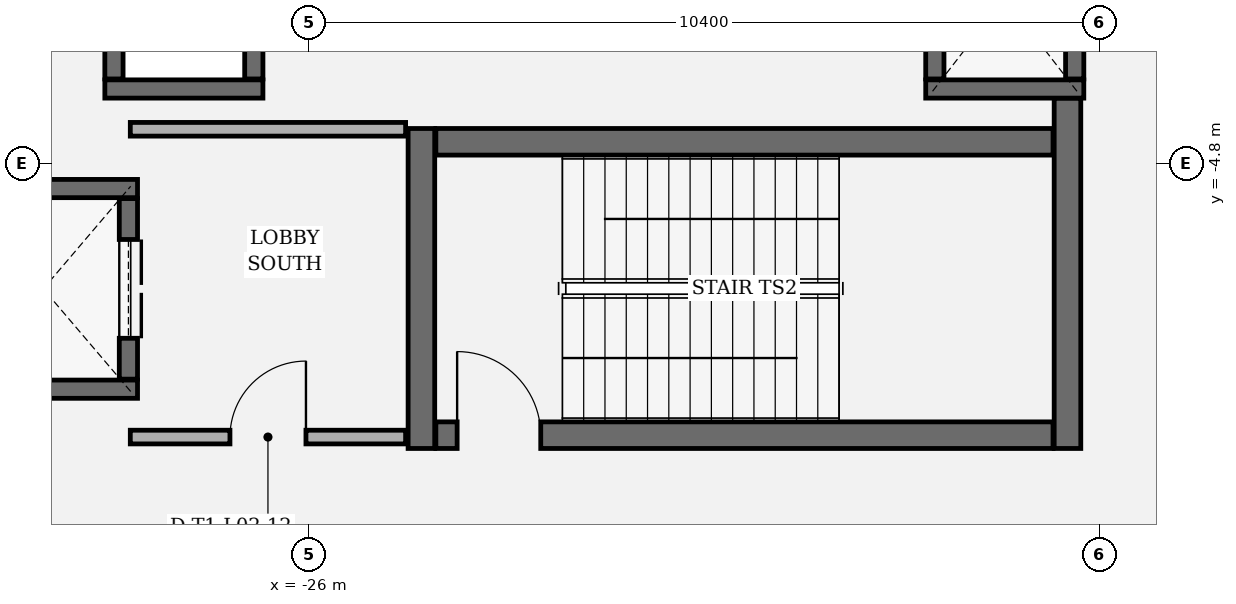
"""IFC4 building model, lengths in metres.
Left out: names, types, materials, properties, quantities, classifications, styles, units other than length and angle.
Written with IfcOpenShell. Run it as: python <this file> out.ifc"""

import sys

from ifc_helpers import new_model, si_unit, direction, frame, frame_2d, origin, place, context, subcontext, project, spatial, rectangle, extrude, element, fill, save


model = new_model("IFC4")
c1 = context("Model", 3, precision=1e-05, world=origin(), true_north=direction((0.0, 1.0)))
c2 = subcontext(c1, "Body", "Model", "MODEL_VIEW")
j1 = project(units=[si_unit("LENGTHUNIT", "METRE"), si_unit("PLANEANGLEUNIT", "RADIAN")], contexts=[c1])
p1 = place(None, origin())
s1 = spatial("IfcSite", under=j1, at=p1, CompositionType="ELEMENT")
p2 = place(p1, origin())
s2 = spatial("IfcBuilding", under=s1, at=p2, CompositionType="ELEMENT")
p3 = place(p2, frame((0.0, 0.0, 12.0)))
s3 = spatial("IfcBuildingStorey", under=s2, at=p3, CompositionType="ELEMENT", Elevation=12.0)
p4 = place(p3, frame((-13.635, -37.094, 0.0), z_axis=(0.0, 0.0, 1.0), x_axis=(-0.842602364841, 0.538536214905, 0.0)))
e1 = element("IfcWall", 1, at=p4, inside=s3, PredefinedType="SOLIDWALL", context=c2, shape_type="SweptSolid", body=[
    extrude(rectangle(XDim=60.27, YDim=0.38, at=frame_2d((30.135, 0.0))), origin(), (0.0, 0.0, 1.0), 4.74),
])
p5 = place(p4, frame((29.435, 0.0, 0.8)))
e2 = element("IfcOpeningElement", 2, at=p5, cuts=e1, PredefinedType="OPENING", context=c2, shape_type="SweptSolid", body=[
    extrude(rectangle(XDim=1.4, YDim=1.5, at=frame_2d((0.7, 0.75))), frame((0.0, 0.2, 0.0), z_axis=(0.0, -1.0, 0.0), x_axis=(1.0, 0.0, 0.0)), (0.0, 0.0, 1.0), 0.4),
])
p6 = place(p3, frame((-24.525, -4.34, 0.0), z_axis=(0.0, 0.0, 1.0), x_axis=(0.0, -1.0, 0.0)))
e3 = element("IfcWall", 3, at=p6, inside=s3, PredefinedType="SHEAR", context=c2, shape_type="SweptSolid", body=[
    extrude(rectangle(XDim=4.21, YDim=0.35, at=frame_2d((2.105, 0.0))), origin(), (0.0, 0.0, 1.0), 4.74),
])
p7 = place(p3, frame((-16.025, -8.55, 0.0), z_axis=(0.0, 0.0, 1.0), x_axis=(0.0, 1.0, 0.0)))
e4 = element("IfcWall", 4, at=p7, inside=s3, PredefinedType="SHEAR", context=c2, shape_type="SweptSolid", body=[
    extrude(rectangle(XDim=4.61, YDim=0.35, at=frame_2d((2.305, 0.0))), origin(), (0.0, 0.0, 1.0), 4.74),
])
p8 = place(p3, frame((-24.335, -8.375, 0.0), z_axis=(0.0, 0.0, 1.0), x_axis=(1.0, 0.0, 0.0)))
e5 = element("IfcWall", 5, at=p8, inside=s3, PredefinedType="SHEAR", context=c2, shape_type="SweptSolid", body=[
    extrude(rectangle(XDim=8.12, YDim=0.35, at=frame_2d((4.06, 0.0))), origin(), (0.0, 0.0, 1.0), 4.74),
])
p9 = place(p8, frame((0.28, 0.0, 0.0)))
e6 = element("IfcOpeningElement", 6, at=p9, cuts=e5, PredefinedType="OPENING", context=c2, shape_type="SweptSolid", body=[
    extrude(rectangle(XDim=1.1, YDim=2.2, at=frame_2d((0.55, 1.1))), frame((0.0, 0.185, 0.0), z_axis=(0.0, -1.0, 0.0), x_axis=(1.0, 0.0, 0.0)), (0.0, 0.0, 1.0), 0.37),
])
p10 = place(p3, frame((-16.215, -4.515, 0.0), z_axis=(0.0, 0.0, 1.0), x_axis=(-1.0, 0.0, 0.0)))
e7 = element("IfcWall", 7, at=p10, inside=s3, PredefinedType="SHEAR", context=c2, shape_type="SweptSolid", body=[
    extrude(rectangle(XDim=8.12, YDim=0.35, at=frame_2d((4.06, 0.0))), origin(), (0.0, 0.0, 1.0), 4.74),
])
for number, where, z_axis, x_axis in (
    (8, (-28.26, -7.77, 0.0), (0.0, 0.0, 1.0), (-1.0, 0.0, 0.0)),
    (9, (-30.74, -5.13, 0.0), (0.0, 0.0, 1.0), (1.0, 0.0, 0.0)),
):
    element("IfcWall", number, at=place(p3, frame(where, z_axis=z_axis, x_axis=x_axis)), inside=s3, PredefinedType="SHEAR", context=c2, shape_type="SweptSolid", body=[
        extrude(rectangle(XDim=2.48, YDim=0.24, at=frame_2d((1.24, 0.0))), origin(), (0.0, 0.0, 1.0), 4.74),
    ])
p11 = place(p3, frame((-28.38, -5.262, 0.0), z_axis=(0.0, 0.0, 1.0), x_axis=(0.0, -1.0, 0.0)))
e10 = element("IfcWall", 10, at=p11, inside=s3, PredefinedType="SHEAR", context=c2, shape_type="SweptSolid", body=[
    extrude(rectangle(XDim=2.376, YDim=0.24, at=frame_2d((1.188, 0.0))), origin(), (0.0, 0.0, 1.0), 4.74),
])
p12 = place(p11, frame((0.538, 0.0, 0.0)))
e11 = element("IfcOpeningElement", 11, at=p12, cuts=e10, PredefinedType="OPENING", context=c2, shape_type="SweptSolid", body=[
    extrude(rectangle(XDim=1.3, YDim=2.3, at=frame_2d((0.65, 1.15))), frame((0.0, 0.13, 0.0), z_axis=(0.0, -1.0, 0.0), x_axis=(1.0, 0.0, 0.0)), (0.0, 0.0, 1.0), 0.26),
])
p13 = place(p3, frame((-26.61, -3.82, 0.0), z_axis=(0.0, 0.0, 1.0), x_axis=(-1.0, 0.0, 0.0)))
e12 = element("IfcWall", 12, at=p13, inside=s3, PredefinedType="SHEAR", context=c2, shape_type="SweptSolid", body=[
    extrude(rectangle(XDim=2.08, YDim=0.24, at=frame_2d((1.04, 0.0))), origin(), (0.0, 0.0, 1.0), 4.74),
])
for number, where, z_axis, x_axis in (
    (13, (-28.57, -3.688, 0.0), (0.0, 0.0, 1.0), (0.0, 1.0, 0.0)),
    (14, (-26.73, -1.562, 0.0), (0.0, 0.0, 1.0), (0.0, -1.0, 0.0)),
):
    element("IfcWall", number, at=place(p3, frame(where, z_axis=z_axis, x_axis=x_axis)), inside=s3, PredefinedType="SHEAR", context=c2, shape_type="SweptSolid", body=[
        extrude(rectangle(XDim=2.126, YDim=0.24, at=frame_2d((1.063, 0.0))), origin(), (0.0, 0.0, 1.0), 4.74),
    ])
p14 = place(p3, frame((-15.81, -3.82, 0.0), z_axis=(0.0, 0.0, 1.0), x_axis=(-1.0, 0.0, 0.0)))
e15 = element("IfcWall", 15, at=p14, inside=s3, PredefinedType="SHEAR", context=c2, shape_type="SweptSolid", body=[
    extrude(rectangle(XDim=2.08, YDim=0.24, at=frame_2d((1.04, 0.0))), origin(), (0.0, 0.0, 1.0), 4.74),
])
for number, where, z_axis, x_axis in (
    (16, (-17.77, -3.688, 0.0), (0.0, 0.0, 1.0), (0.0, 1.0, 0.0)),
    (17, (-15.93, -1.562, 0.0), (0.0, 0.0, 1.0), (0.0, -1.0, 0.0)),
):
    element("IfcWall", number, at=place(p3, frame(where, z_axis=z_axis, x_axis=x_axis)), inside=s3, PredefinedType="SHEAR", context=c2, shape_type="SweptSolid", body=[
        extrude(rectangle(XDim=2.126, YDim=0.24, at=frame_2d((1.063, 0.0))), origin(), (0.0, 0.0, 1.0), 4.74),
    ])
p15 = place(p3, frame((-28.355, -8.4, 0.0), z_axis=(0.0, 0.0, 1.0), x_axis=(1.0, 0.0, 0.0)))
e18 = element("IfcWall", 18, at=p15, inside=s3, PredefinedType="PARTITIONING", context=c2, shape_type="SweptSolid", body=[
    extrude(rectangle(XDim=3.622, YDim=0.18, at=frame_2d((1.811, 0.0))), origin(), (0.0, 0.0, 1.0), 4.74),
])
p16 = place(p15, frame((1.311, 0.0, 0.0)))
e19 = element("IfcOpeningElement", 19, at=p16, cuts=e18, PredefinedType="OPENING", context=c2, shape_type="SweptSolid", body=[
    extrude(rectangle(XDim=1.0, YDim=2.15, at=frame_2d((0.5, 1.075))), frame((0.0, 0.1, 0.0), z_axis=(0.0, -1.0, 0.0), x_axis=(1.0, 0.0, 0.0)), (0.0, 0.0, 1.0), 0.2),
])
p17 = place(p3, frame((-24.733, -4.35, 0.0), z_axis=(0.0, 0.0, 1.0), x_axis=(-1.0, 0.0, 0.0)))
e20 = element("IfcWall", 20, at=p17, inside=s3, PredefinedType="PARTITIONING", context=c2, shape_type="SweptSolid", body=[
    extrude(rectangle(XDim=3.622, YDim=0.18, at=frame_2d((1.811, 0.0))), origin(), (0.0, 0.0, 1.0), 4.74),
])
p18 = place(p9, origin())
e21 = element("IfcDoor", 21, at=p18, inside=s3, OperationType="SINGLE_SWING_LEFT", PredefinedType="DOOR", context=c2, shape_type="SweptSolid", body=[
    extrude(rectangle(XDim=1.1, YDim=2.2, at=frame_2d((0.55, 1.1))), frame((0.0, 0.025, 0.0), z_axis=(0.0, -1.0, 0.0), x_axis=(1.0, 0.0, 0.0)), (0.0, 0.0, 1.0), 0.05),
])
fill(e6, e21)
p19 = place(p12, origin())
e22 = element("IfcDoor", 22, at=p19, inside=s3, OperationType="DOUBLE_DOOR_SLIDING", PredefinedType="DOOR", context=c2, shape_type="SweptSolid", body=[
    extrude(rectangle(XDim=1.3, YDim=2.3, at=frame_2d((0.65, 1.15))), frame((0.0, 0.025, 0.0), z_axis=(0.0, -1.0, 0.0), x_axis=(1.0, 0.0, 0.0)), (0.0, 0.0, 1.0), 0.05),
])
fill(e11, e22)
p20 = place(p16, origin())
e23 = element("IfcDoor", 23, at=p20, inside=s3, OperationType="SINGLE_SWING_RIGHT", PredefinedType="DOOR", context=c2, shape_type="SweptSolid", body=[
    extrude(rectangle(XDim=1.0, YDim=2.15, at=frame_2d((0.5, 1.075))), frame((0.0, 0.025, 0.0), z_axis=(0.0, -1.0, 0.0), x_axis=(1.0, 0.0, 0.0)), (0.0, 0.0, 1.0), 0.05),
])
fill(e19, e23)
save(model, sys.argv[1])
